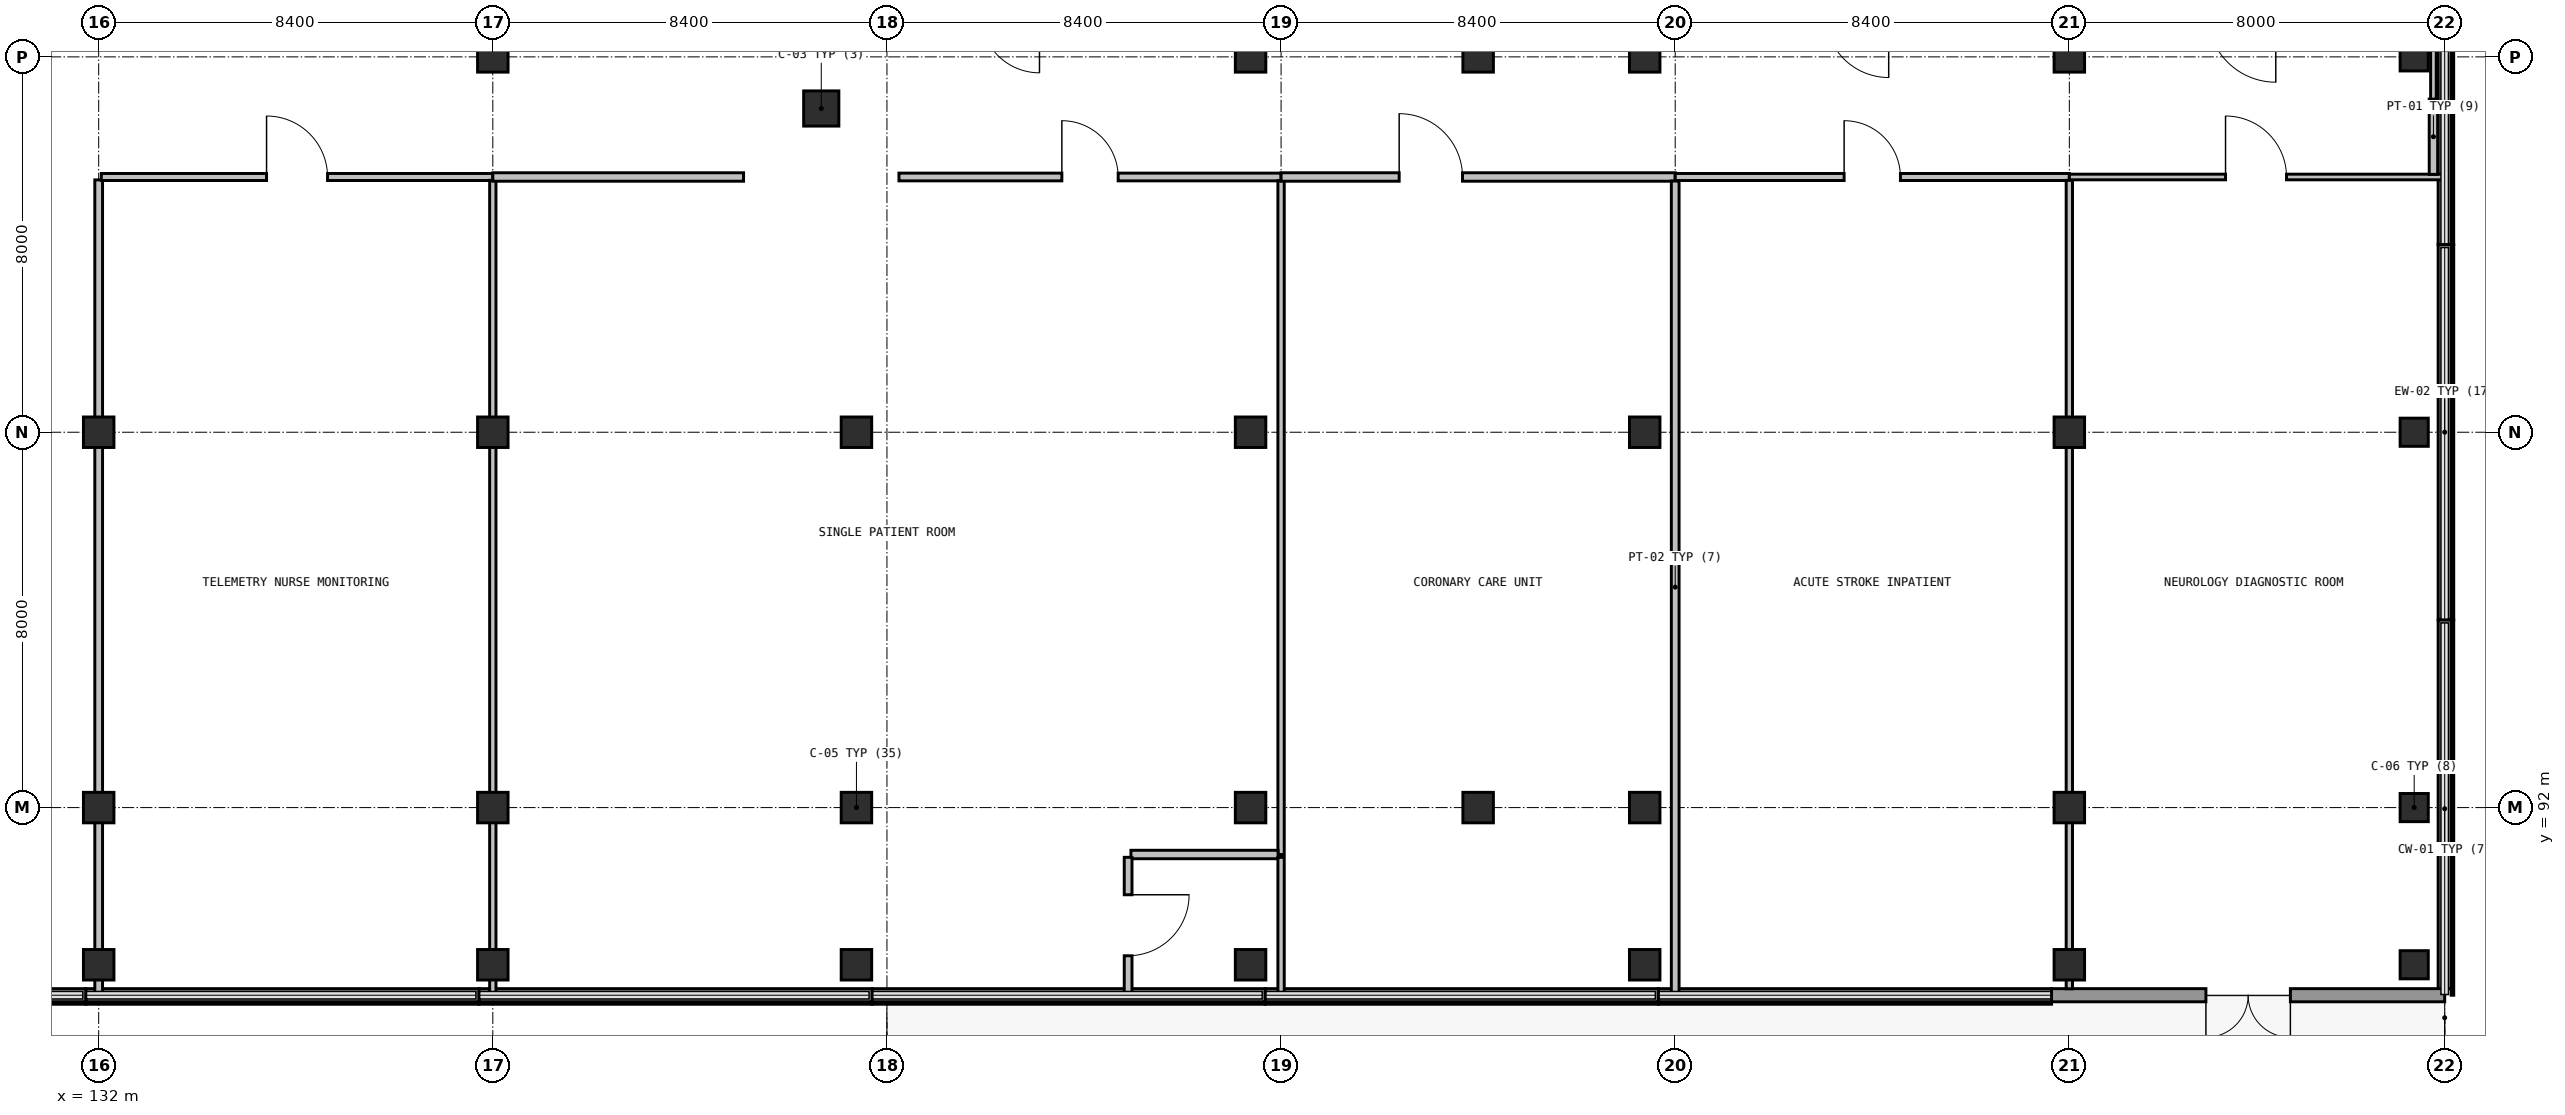
"""IFC4 building model, lengths in metres.
Left out: names, types, materials, properties, quantities, classifications, styles, units other than length and angle.
Written with IfcOpenShell. Run it as: python <this file> out.ifc"""

import sys

from ifc_helpers import new_model, si_unit, direction, frame, frame_2d, origin, origin_2d, place, context, subcontext, project, spatial, rectangle, extrude, element, fill, save


model = new_model("IFC4")
c1 = context("Model", 3, precision=1e-05, world=origin(), true_north=direction((0.0, 1.0)))
c2 = subcontext(c1, "Body", "Model", "MODEL_VIEW")
j1 = project(units=[si_unit("LENGTHUNIT", "METRE"), si_unit("PLANEANGLEUNIT", "RADIAN")], contexts=[c1])
p1 = place(None, origin())
s1 = spatial("IfcSite", under=j1, at=p1, CompositionType="ELEMENT")
p2 = place(p1, origin())
s2 = spatial("IfcBuilding", under=s1, at=p2, CompositionType="ELEMENT")
p3 = place(p2, frame((0.0, 0.0, 27.3)))
s3 = spatial("IfcBuildingStorey", under=s2, at=p3, CompositionType="ELEMENT", Elevation=27.3)
p4 = place(p3, frame((147.4, 106.9, 0.0), z_axis=(0.0, 0.0, 1.0), x_axis=(1.0, 0.0, 0.0)))
e1 = element("IfcColumn", 1, at=p4, inside=s3, PredefinedType="COLUMN", context=c2, shape_type="SweptSolid", body=[
    extrude(rectangle(XDim=0.75, YDim=0.75, at=origin_2d()), origin(), (0.0, 0.0, 1.0), 4.05),
])
for number, where, z_axis, x_axis in (
    (2, (161.4, 92.0, 0.0), (0.0, 0.0, 1.0), (1.0, 0.0, 0.0)),
    (3, (161.4, 108.0, 0.0), (0.0, 0.0, 1.0), (1.0, 0.0, 0.0)),
    (4, (132.0, 88.65, 0.0), (0.0, 0.0, 1.0), (1.0, 0.0, 0.0)),
    (5, (132.0, 92.0, 0.0), (0.0, 0.0, 1.0), (1.0, 0.0, 0.0)),
    (6, (132.0, 100.0, 0.0), (0.0, 0.0, 1.0), (1.0, 0.0, 0.0)),
    (7, (140.4, 88.65, 0.0), (0.0, 0.0, 1.0), (1.0, 0.0, 0.0)),
    (8, (140.4, 92.0, 0.0), (0.0, 0.0, 1.0), (1.0, 0.0, 0.0)),
    (9, (140.4, 100.0, 0.0), (0.0, 0.0, 1.0), (1.0, 0.0, 0.0)),
    (10, (140.4, 108.0, 0.0), (0.0, 0.0, 1.0), (1.0, 0.0, 0.0)),
    (11, (148.15, 88.65, 0.0), (0.0, 0.0, 1.0), (1.0, 0.0, 0.0)),
    (12, (148.15, 92.0, 0.0), (0.0, 0.0, 1.0), (1.0, 0.0, 0.0)),
    (13, (148.15, 100.0, 0.0), (0.0, 0.0, 1.0), (1.0, 0.0, 0.0)),
    (14, (156.55, 88.65, 0.0), (0.0, 0.0, 1.0), (1.0, 0.0, 0.0)),
    (15, (156.55, 92.0, 0.0), (0.0, 0.0, 1.0), (1.0, 0.0, 0.0)),
    (16, (156.55, 100.0, 0.0), (0.0, 0.0, 1.0), (1.0, 0.0, 0.0)),
    (17, (156.55, 108.0, 0.0), (0.0, 0.0, 1.0), (1.0, 0.0, 0.0)),
    (18, (164.95, 88.65, 0.0), (0.0, 0.0, 1.0), (1.0, 0.0, 0.0)),
    (19, (164.95, 92.0, 0.0), (0.0, 0.0, 1.0), (1.0, 0.0, 0.0)),
    (20, (164.95, 100.0, 0.0), (0.0, 0.0, 1.0), (1.0, 0.0, 0.0)),
    (21, (164.95, 108.0, 0.0), (0.0, 0.0, 1.0), (1.0, 0.0, 0.0)),
):
    element("IfcColumn", number, at=place(p3, frame(where, z_axis=z_axis, x_axis=x_axis)), inside=s3, PredefinedType="COLUMN", context=c2, shape_type="SweptSolid", body=[
        extrude(rectangle(XDim=0.65, YDim=0.65, at=origin_2d()), origin(), (0.0, 0.0, 1.0), 4.05),
    ])
for number, where, z_axis, x_axis in (
    (22, (174.0, 88.65, 0.0), (0.0, 0.0, 1.0), (1.0, 0.0, 0.0)),
    (23, (174.0, 92.0, 0.0), (0.0, 0.0, 1.0), (1.0, 0.0, 0.0)),
    (24, (174.0, 100.0, 0.0), (0.0, 0.0, 1.0), (1.0, 0.0, 0.0)),
    (25, (174.0, 108.0, 0.0), (0.0, 0.0, 1.0), (1.0, 0.0, 0.0)),
):
    element("IfcColumn", number, at=place(p3, frame(where, z_axis=z_axis, x_axis=x_axis)), inside=s3, PredefinedType="COLUMN", context=c2, shape_type="SweptSolid", body=[
        extrude(rectangle(XDim=0.65, YDim=0.65, at=origin_2d()), origin(), (0.0, 0.0, 1.0), 3.778),
    ])
for number, where, z_axis, x_axis in (
    (26, (181.35, 88.65, 0.0), (0.0, 0.0, 1.0), (1.0, 0.0, 0.0)),
    (27, (181.35, 92.0, 0.0), (0.0, 0.0, 1.0), (1.0, 0.0, 0.0)),
    (28, (181.35, 100.0, 0.0), (0.0, 0.0, 1.0), (1.0, 0.0, 0.0)),
    (29, (181.35, 108.0, 0.0), (0.0, 0.0, 1.0), (1.0, 0.0, 0.0)),
):
    element("IfcColumn", number, at=place(p3, frame(where, z_axis=z_axis, x_axis=x_axis)), inside=s3, PredefinedType="COLUMN", context=c2, shape_type="SweptSolid", body=[
        extrude(rectangle(XDim=0.6, YDim=0.6, at=origin_2d()), origin(), (0.0, 0.0, 1.0), 3.778),
    ])
p5 = place(p3, frame((181.999, 111.998, 0.0), z_axis=(0.0, 0.0, 1.0), x_axis=(0.000122144863, -0.99999999254, 0.0)))
e30 = element("IfcWall", 30, at=p5, inside=s3, PredefinedType="SOLIDWALL", context=c2, shape_type="SweptSolid", body=[
    extrude(rectangle(XDim=7.995, YDim=0.28, at=frame_2d((3.998, 0.0))), origin(), (0.0, 0.0, 1.0), 0.94),
])
p6 = place(p3, frame((182.0, 103.999, 0.0), z_axis=(0.0, 0.0, 1.0), x_axis=(0.0, -1.0, 0.0)))
e31 = element("IfcWall", 31, at=p6, inside=s3, PredefinedType="SOLIDWALL", context=c2, shape_type="SweptSolid", body=[
    extrude(rectangle(XDim=7.996, YDim=0.28, at=frame_2d((3.998, 0.0))), origin(), (0.0, 0.0, 1.0), 0.94),
])
p7 = place(p3, frame((182.0, 95.999, 0.0), z_axis=(0.0, 0.0, 1.0), x_axis=(0.0, -1.0, 0.0)))
e32 = element("IfcWall", 32, at=p7, inside=s3, PredefinedType="SOLIDWALL", context=c2, shape_type="SweptSolid", body=[
    extrude(rectangle(XDim=7.858, YDim=0.28, at=frame_2d((3.929, 0.0))), origin(), (0.0, 0.0, 1.0), 0.94),
])
p8 = place(p3, frame((182.0, 88.001, 0.0), z_axis=(0.0, 0.0, 1.0), x_axis=(-1.0, 0.0, 0.0)))
e33 = element("IfcWall", 33, at=p8, inside=s3, PredefinedType="SOLIDWALL", context=c2, shape_type="SweptSolid", body=[
    extrude(rectangle(XDim=8.379, YDim=0.28, at=frame_2d((4.189, 0.0))), origin(), (0.0, 0.0, 1.0), 3.78),
])
p9 = place(p8, frame((3.289, 0.0, 0.0)))
e34 = element("IfcOpeningElement", 34, at=p9, cuts=e33, PredefinedType="OPENING", context=c2, shape_type="SweptSolid", body=[
    extrude(rectangle(XDim=1.8, YDim=2.2, at=frame_2d((0.9, 1.1))), frame((0.0, 0.15, 0.0), z_axis=(0.0, -1.0, 0.0), x_axis=(1.0, 0.0, 0.0)), (0.0, 0.0, 1.0), 0.3),
])
for number, where, z_axis, x_axis in (
    (35, (173.619, 88.001, 0.0), (0.0, 0.0, 1.0), (-1.0, 0.0, 0.0)),
    (36, (165.24, 88.001, 0.0), (0.0, 0.0, 1.0), (-1.0, 0.0, 0.0)),
    (37, (156.861, 88.001, 0.0), (0.0, 0.0, 1.0), (-1.0, 0.0, 0.0)),
    (38, (148.482, 88.001, 0.0), (0.0, 0.0, 1.0), (-1.0, 0.0, 0.0)),
    (39, (140.103, 88.001, 0.0), (0.0, 0.0, 1.0), (-1.0, 0.0, 0.0)),
    (40, (131.724, 88.001, 0.0), (0.0, 0.0, 1.0), (-1.0, 0.0, 0.0)),
):
    element("IfcWall", number, at=place(p3, frame(where, z_axis=z_axis, x_axis=x_axis)), inside=s3, PredefinedType="SOLIDWALL", context=c2, shape_type="SweptSolid", body=[
        extrude(rectangle(XDim=8.375, YDim=0.28, at=frame_2d((4.188, 0.0))), origin(), (0.0, 0.0, 1.0), 0.94),
    ])
p10 = place(p3, frame((132.0, 105.378, 0.0), z_axis=(0.0, 0.0, 1.0), x_axis=(0.0, -1.0, 0.0)))
e41 = element("IfcWall", 41, at=p10, inside=s3, PredefinedType="PARTITIONING", context=c2, shape_type="SweptSolid", body=[
    extrude(rectangle(XDim=17.335, YDim=0.165, at=frame_2d((8.667, 0.0))), origin(), (0.0, 0.0, 1.0), 3.18),
])
p11 = place(p3, frame((132.056, 105.44, 0.0), z_axis=(0.0, 0.0, 1.0), x_axis=(1.0, 0.0, 0.0)))
e42 = element("IfcWall", 42, at=p11, inside=s3, PredefinedType="PARTITIONING", context=c2, shape_type="SweptSolid", body=[
    extrude(rectangle(XDim=8.344, YDim=0.15, at=frame_2d((4.172, 0.0))), origin(), (0.0, 0.0, 1.0), 3.78),
])
p12 = place(p11, frame((3.522, 0.0, 0.0)))
e43 = element("IfcOpeningElement", 43, at=p12, cuts=e42, PredefinedType="OPENING", context=c2, shape_type="SweptSolid", body=[
    extrude(rectangle(XDim=1.3, YDim=2.15, at=frame_2d((0.65, 1.075))), frame((0.0, 0.085, 0.0), z_axis=(0.0, -1.0, 0.0), x_axis=(1.0, 0.0, 0.0)), (0.0, 0.0, 1.0), 0.17),
])
p13 = place(p3, frame((140.4, 105.369, 0.0), z_axis=(0.0, 0.0, 1.0), x_axis=(0.0, -1.0, 0.0)))
e44 = element("IfcWall", 44, at=p13, inside=s3, PredefinedType="PARTITIONING", context=c2, shape_type="SweptSolid", body=[
    extrude(rectangle(XDim=17.326, YDim=0.135, at=frame_2d((8.663, 0.0))), origin(), (0.0, 0.0, 1.0), 3.18),
])
p14 = place(p3, frame((140.4, 105.44, 0.0), z_axis=(0.0, 0.0, 1.0), x_axis=(1.0, 0.0, 0.0)))
e45 = element("IfcWall", 45, at=p14, inside=s3, PredefinedType="PARTITIONING", context=c2, shape_type="SweptSolid", body=[
    extrude(rectangle(XDim=5.344, YDim=0.18, at=frame_2d((2.672, 0.0))), origin(), (0.0, 0.0, 1.0), 3.78),
])
p15 = place(p3, frame((149.056, 105.44, 0.0), z_axis=(0.0, 0.0, 1.0), x_axis=(1.0, 0.0, 0.0)))
e46 = element("IfcWall", 46, at=p15, inside=s3, PredefinedType="PARTITIONING", context=c2, shape_type="SweptSolid", body=[
    extrude(rectangle(XDim=8.144, YDim=0.165, at=frame_2d((4.072, 0.0))), origin(), (0.0, 0.0, 1.0), 3.78),
])
p16 = place(p15, frame((3.472, 0.0, 0.0)))
e47 = element("IfcOpeningElement", 47, at=p16, cuts=e46, PredefinedType="OPENING", context=c2, shape_type="SweptSolid", body=[
    extrude(rectangle(XDim=1.2, YDim=2.15, at=frame_2d((0.6, 1.075))), frame((0.0, 0.093, 0.0), z_axis=(0.0, -1.0, 0.0), x_axis=(1.0, 0.0, 0.0)), (0.0, 0.0, 1.0), 0.185),
])
p17 = place(p3, frame((157.2, 105.361, 0.0), z_axis=(0.0, 0.0, 1.0), x_axis=(0.0, -1.0, 0.0)))
e48 = element("IfcWall", 48, at=p17, inside=s3, PredefinedType="PARTITIONING", context=c2, shape_type="SweptSolid", body=[
    extrude(rectangle(XDim=14.361, YDim=0.135, at=frame_2d((7.181, 0.0))), origin(), (0.0, 0.0, 1.0), 3.78),
])
p18 = place(p3, frame((157.136, 91.0, 0.0), z_axis=(0.0, 0.0, 1.0), x_axis=(-1.0, 0.0, 0.0)))
e49 = element("IfcWall", 49, at=p18, inside=s3, PredefinedType="PARTITIONING", context=c2, shape_type="SweptSolid", body=[
    extrude(rectangle(XDim=3.136, YDim=0.18, at=frame_2d((1.568, 0.0))), origin(), (0.0, 0.0, 1.0), 3.78),
])
p19 = place(p3, frame((153.94, 90.94, 0.0), z_axis=(0.0, 0.0, 1.0), x_axis=(0.0, -1.0, 0.0)))
e50 = element("IfcWall", 50, at=p19, inside=s3, PredefinedType="PARTITIONING", context=c2, shape_type="SweptSolid", body=[
    extrude(rectangle(XDim=2.897, YDim=0.165, at=frame_2d((1.448, 0.0))), origin(), (0.0, 0.0, 1.0), 3.78),
])
p20 = place(p19, frame((0.798, 0.0, 0.0)))
e51 = element("IfcOpeningElement", 51, at=p20, cuts=e50, PredefinedType="OPENING", context=c2, shape_type="SweptSolid", body=[
    extrude(rectangle(XDim=1.3, YDim=2.15, at=frame_2d((0.65, 1.075))), frame((0.0, 0.093, 0.0), z_axis=(0.0, -1.0, 0.0), x_axis=(1.0, 0.0, 0.0)), (0.0, 0.0, 1.0), 0.185),
])
p21 = place(p3, frame((157.2, 90.94, 0.0), z_axis=(0.0, 0.0, 1.0), x_axis=(0.0, -1.0, 0.0)))
e52 = element("IfcWall", 52, at=p21, inside=s3, PredefinedType="PARTITIONING", context=c2, shape_type="SweptSolid", body=[
    extrude(rectangle(XDim=2.897, YDim=0.135, at=frame_2d((1.448, 0.0))), origin(), (0.0, 0.0, 1.0), 3.78),
])
p22 = place(p3, frame((157.2, 105.44, 0.0), z_axis=(0.0, 0.0, 1.0), x_axis=(1.0, 0.0, 0.0)))
e53 = element("IfcWall", 53, at=p22, inside=s3, PredefinedType="PARTITIONING", context=c2, shape_type="SweptSolid", body=[
    extrude(rectangle(XDim=8.4, YDim=0.18, at=frame_2d((4.2, 0.0))), origin(), (0.0, 0.0, 1.0), 3.78),
])
p23 = place(p22, frame((2.517, 0.0, 0.0)))
e54 = element("IfcOpeningElement", 54, at=p23, cuts=e53, PredefinedType="OPENING", context=c2, shape_type="SweptSolid", body=[
    extrude(rectangle(XDim=1.35, YDim=2.15, at=frame_2d((0.675, 1.075))), frame((0.0, 0.1, 0.0), z_axis=(0.0, -1.0, 0.0), x_axis=(1.0, 0.0, 0.0)), (0.0, 0.0, 1.0), 0.2),
])
p24 = place(p3, frame((165.6, 105.354, 0.0), z_axis=(0.0, 0.0, 1.0), x_axis=(0.0, -1.0, 0.0)))
e55 = element("IfcWall", 55, at=p24, inside=s3, PredefinedType="PARTITIONING", context=c2, shape_type="SweptSolid", body=[
    extrude(rectangle(XDim=17.311, YDim=0.165, at=frame_2d((8.656, 0.0))), origin(), (0.0, 0.0, 1.0), 3.78),
])
p25 = place(p3, frame((165.6, 105.44, 0.0), z_axis=(0.0, 0.0, 1.0), x_axis=(1.0, 0.0, 0.0)))
e56 = element("IfcWall", 56, at=p25, inside=s3, PredefinedType="PARTITIONING", context=c2, shape_type="SweptSolid", body=[
    extrude(rectangle(XDim=8.4, YDim=0.15, at=frame_2d((4.2, 0.0))), origin(), (0.0, 0.0, 1.0), 3.78),
])
p26 = place(p25, frame((3.6, 0.0, 0.0)))
e57 = element("IfcOpeningElement", 57, at=p26, cuts=e56, PredefinedType="OPENING", context=c2, shape_type="SweptSolid", body=[
    extrude(rectangle(XDim=1.2, YDim=2.15, at=frame_2d((0.6, 1.075))), frame((0.0, 0.085, 0.0), z_axis=(0.0, -1.0, 0.0), x_axis=(1.0, 0.0, 0.0)), (0.0, 0.0, 1.0), 0.17),
])
p27 = place(p3, frame((174.0, 105.369, 0.0), z_axis=(0.0, 0.0, 1.0), x_axis=(0.0, -1.0, 0.0)))
e58 = element("IfcWall", 58, at=p27, inside=s3, PredefinedType="PARTITIONING", context=c2, shape_type="SweptSolid", body=[
    extrude(rectangle(XDim=17.231, YDim=0.135, at=frame_2d((8.615, 0.0))), origin(), (0.0, 0.0, 1.0), 3.178),
])
p28 = place(p3, frame((174.0, 105.44, 0.0), z_axis=(0.0, 0.0, 1.0), x_axis=(1.0, 0.0, 0.0)))
e59 = element("IfcWall", 59, at=p28, inside=s3, PredefinedType="PARTITIONING", context=c2, shape_type="SweptSolid", body=[
    extrude(rectangle(XDim=7.958, YDim=0.12, at=frame_2d((3.979, 0.0))), origin(), (0.0, 0.0, 1.0), 3.78),
])
p29 = place(p28, frame((3.329, 0.0, 0.0)))
e60 = element("IfcOpeningElement", 60, at=p29, cuts=e59, PredefinedType="OPENING", context=c2, shape_type="SweptSolid", body=[
    extrude(rectangle(XDim=1.3, YDim=2.15, at=frame_2d((0.65, 1.075))), frame((0.0, 0.07, 0.0), z_axis=(0.0, -1.0, 0.0), x_axis=(1.0, 0.0, 0.0)), (0.0, 0.0, 1.0), 0.14),
])
p30 = place(p3, frame((181.76, 105.496, 0.0), z_axis=(0.0, 0.0, 1.0), x_axis=(0.0, 1.0, 0.0)))
e61 = element("IfcWall", 61, at=p30, inside=s3, PredefinedType="PARTITIONING", context=c2, shape_type="SweptSolid", body=[
    extrude(rectangle(XDim=1.604, YDim=0.18, at=frame_2d((0.802, 0.0))), origin(), (0.0, 0.0, 1.0), 3.78),
])
p31 = place(p3, frame((181.76, 107.1, 0.0), z_axis=(0.0, 0.0, 1.0), x_axis=(0.0, 1.0, 0.0)))
e62 = element("IfcWall", 62, at=p31, inside=s3, PredefinedType="PARTITIONING", context=c2, shape_type="SweptSolid", body=[
    extrude(rectangle(XDim=3.019, YDim=0.12, at=frame_2d((1.509, 0.0))), origin(), (0.0, 0.0, 1.0), 3.78),
])
p32 = place(p9, origin())
e63 = element("IfcDoor", 63, at=p32, inside=s3, OperationType="DOUBLE_DOOR_SINGLE_SWING", PredefinedType="DOOR", context=c2, shape_type="SweptSolid", body=[
    extrude(rectangle(XDim=1.8, YDim=2.2, at=frame_2d((0.9, 1.1))), frame((0.0, 0.025, 0.0), z_axis=(0.0, -1.0, 0.0), x_axis=(1.0, 0.0, 0.0)), (0.0, 0.0, 1.0), 0.05),
])
fill(e34, e63)
p33 = place(p12, origin())
e64 = element("IfcDoor", 64, at=p33, inside=s3, OperationType="SINGLE_SWING_LEFT", PredefinedType="DOOR", context=c2, shape_type="SweptSolid", body=[
    extrude(rectangle(XDim=1.3, YDim=2.15, at=frame_2d((0.65, 1.075))), frame((0.0, 0.025, 0.0), z_axis=(0.0, -1.0, 0.0), x_axis=(1.0, 0.0, 0.0)), (0.0, 0.0, 1.0), 0.05),
])
fill(e43, e64)
p34 = place(p16, origin())
e65 = element("IfcDoor", 65, at=p34, inside=s3, OperationType="SINGLE_SWING_RIGHT", PredefinedType="DOOR", context=c2, shape_type="SweptSolid", body=[
    extrude(rectangle(XDim=1.2, YDim=2.15, at=frame_2d((0.6, 1.075))), frame((0.0, 0.025, 0.0), z_axis=(0.0, -1.0, 0.0), x_axis=(1.0, 0.0, 0.0)), (0.0, 0.0, 1.0), 0.05),
])
fill(e47, e65)
p35 = place(p20, origin())
e66 = element("IfcDoor", 66, at=p35, inside=s3, OperationType="SINGLE_SWING_LEFT", PredefinedType="DOOR", context=c2, shape_type="SweptSolid", body=[
    extrude(rectangle(XDim=1.3, YDim=2.15, at=frame_2d((0.65, 1.075))), frame((0.0, 0.025, 0.0), z_axis=(0.0, -1.0, 0.0), x_axis=(1.0, 0.0, 0.0)), (0.0, 0.0, 1.0), 0.05),
])
fill(e51, e66)
p36 = place(p23, origin())
e67 = element("IfcDoor", 67, at=p36, inside=s3, OperationType="SINGLE_SWING_RIGHT", PredefinedType="DOOR", context=c2, shape_type="SweptSolid", body=[
    extrude(rectangle(XDim=1.35, YDim=2.15, at=frame_2d((0.675, 1.075))), frame((0.0, 0.025, 0.0), z_axis=(0.0, -1.0, 0.0), x_axis=(1.0, 0.0, 0.0)), (0.0, 0.0, 1.0), 0.05),
])
fill(e54, e67)
p37 = place(p26, origin())
e68 = element("IfcDoor", 68, at=p37, inside=s3, OperationType="SINGLE_SWING_LEFT", PredefinedType="DOOR", context=c2, shape_type="SweptSolid", body=[
    extrude(rectangle(XDim=1.2, YDim=2.15, at=frame_2d((0.6, 1.075))), frame((0.0, 0.025, 0.0), z_axis=(0.0, -1.0, 0.0), x_axis=(1.0, 0.0, 0.0)), (0.0, 0.0, 1.0), 0.05),
])
fill(e57, e68)
p38 = place(p29, origin())
e69 = element("IfcDoor", 69, at=p38, inside=s3, OperationType="SINGLE_SWING_RIGHT", PredefinedType="DOOR", context=c2, shape_type="SweptSolid", body=[
    extrude(rectangle(XDim=1.3, YDim=2.15, at=frame_2d((0.65, 1.075))), frame((0.0, 0.025, 0.0), z_axis=(0.0, -1.0, 0.0), x_axis=(1.0, 0.0, 0.0)), (0.0, 0.0, 1.0), 0.05),
])
fill(e60, e69)
save(model, sys.argv[1])
